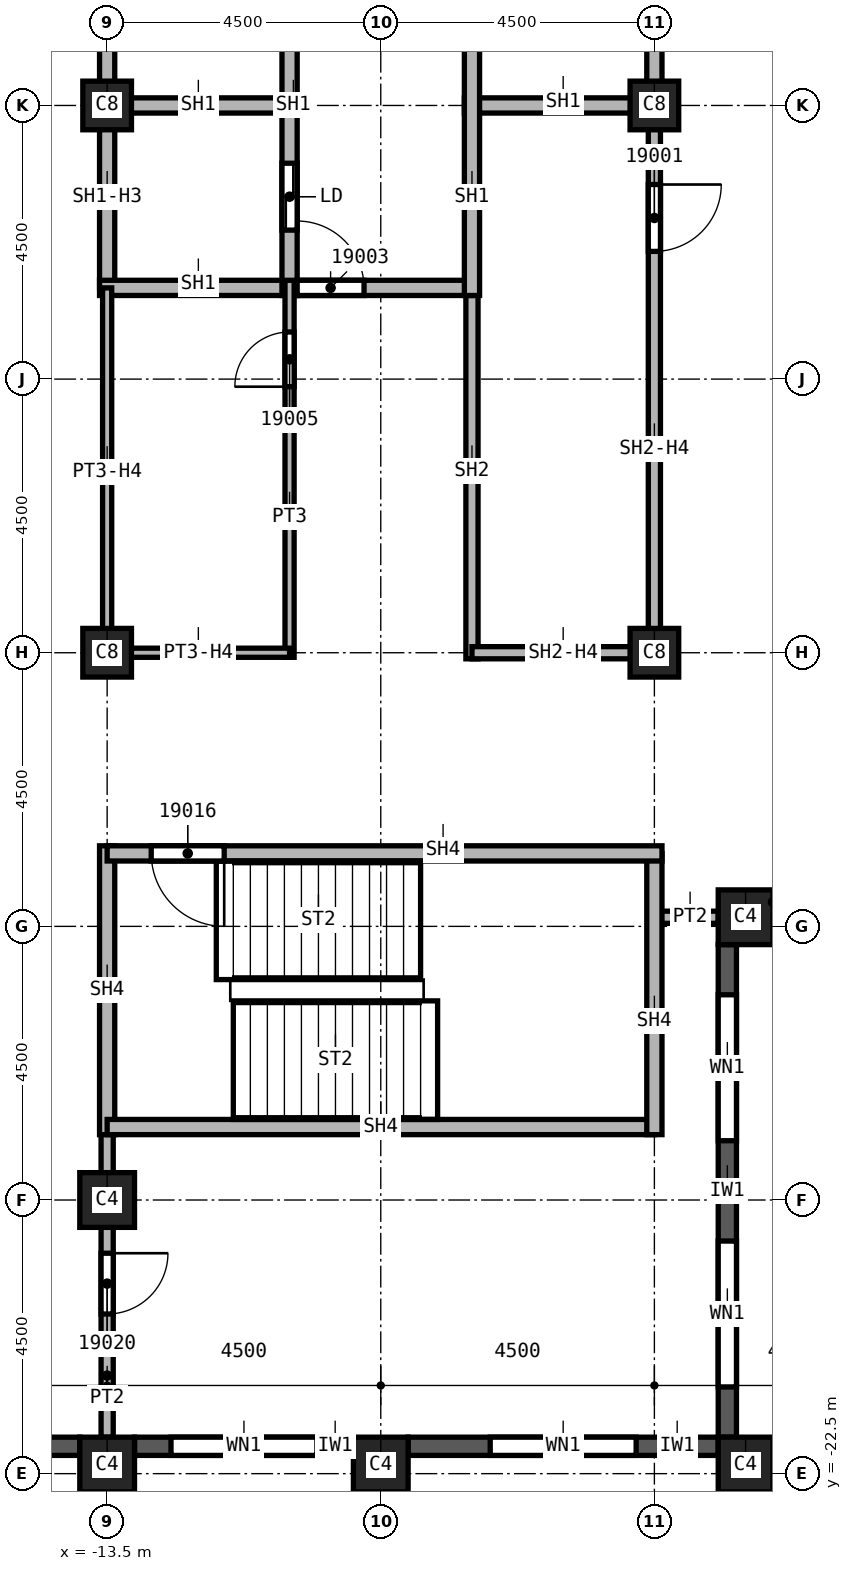
"""IFC4 building model, lengths in metres.
Left out: names, types, materials, properties, quantities, classifications, styles, units other than length and angle.
Written with IfcOpenShell. Run it as: python <this file> out.ifc"""

import sys

from ifc_helpers import new_model, si_unit, direction, frame, frame_2d, origin, origin_2d, place, context, subcontext, project, spatial, rectangle, extrude, element, fill, save


model = new_model("IFC4")
c1 = context("Model", 3, precision=1e-05, world=origin(), true_north=direction((0.0, 1.0)))
c2 = subcontext(c1, "Body", "Model", "MODEL_VIEW")
j1 = project(units=[si_unit("LENGTHUNIT", "METRE"), si_unit("PLANEANGLEUNIT", "RADIAN")], contexts=[c1])
p1 = place(None, origin())
s1 = spatial("IfcSite", under=j1, at=p1, CompositionType="ELEMENT")
p2 = place(p1, origin())
s2 = spatial("IfcBuilding", under=s1, at=p2, CompositionType="ELEMENT")
p3 = place(p2, frame((0.0, 0.0, 278.0)))
s3 = spatial("IfcBuildingStorey", under=s2, at=p3, CompositionType="ELEMENT", Elevation=278.0)
p4 = place(p3, frame((-13.5, -18.0, 0.0), z_axis=(0.0, 0.0, 1.0), x_axis=(1.0, 0.0, 0.0)))
e1 = element("IfcColumn", 1, at=p4, inside=s3, PredefinedType="COLUMN", context=c2, shape_type="SweptSolid", body=[
    extrude(rectangle(XDim=0.9, YDim=0.9, at=origin_2d()), origin(), (0.0, 0.0, 1.0), 3.72),
])
for number, where, z_axis, x_axis in (
    (2, (-4.5, 0.0, 0.0), (0.0, 0.0, 1.0), (1.0, 0.0, 0.0)),
    (3, (-4.5, -9.0, 0.0), (0.0, 0.0, 1.0), (1.0, 0.0, 0.0)),
    (4, (-13.5, 0.0, 0.0), (0.0, 0.0, 1.0), (1.0, 0.0, 0.0)),
    (5, (-13.5, -9.0, 0.0), (0.0, 0.0, 1.0), (1.0, 0.0, 0.0)),
):
    element("IfcColumn", number, at=place(p3, frame(where, z_axis=z_axis, x_axis=x_axis)), inside=s3, PredefinedType="COLUMN", context=c2, shape_type="SweptSolid", body=[
        extrude(rectangle(XDim=0.8, YDim=0.8, at=origin_2d()), origin(), (0.0, 0.0, 1.0), 3.72),
    ])
for number, where, z_axis, x_axis in (
    (6, (-3.0, -22.35, 0.0), (0.0, 0.0, 1.0), (1.0, 0.0, 0.0)),
    (7, (-9.0, -22.35, 0.0), (0.0, 0.0, 1.0), (1.0, 0.0, 0.0)),
    (8, (-13.5, -22.35, 0.0), (0.0, 0.0, 1.0), (1.0, 0.0, 0.0)),
    (9, (-3.0, -13.35, 0.0), (0.0, 0.0, 1.0), (1.0, 0.0, 0.0)),
):
    element("IfcColumn", number, at=place(p3, frame(where, z_axis=z_axis, x_axis=x_axis)), inside=s3, PredefinedType="COLUMN", context=c2, shape_type="SweptSolid", body=[
        extrude(rectangle(XDim=0.9, YDim=0.9, at=origin_2d()), origin(), (0.0, 0.0, 1.0), 3.72),
    ])
p5 = place(p3, frame((-17.55, -22.05, 0.0), z_axis=(0.0, 0.0, 1.0), x_axis=(1.0, 0.0, 0.0)))
e10 = element("IfcWall", 10, at=p5, inside=s3, PredefinedType="SOLIDWALL", context=c2, shape_type="SweptSolid", body=[
    extrude(rectangle(XDim=3.6, YDim=0.3, at=frame_2d((1.8, 0.0))), origin(), (0.0, 0.0, 1.0), 3.12),
])
p6 = place(p5, frame((0.775, 0.0, 0.8)))
e11 = element("IfcOpeningElement", 11, at=p6, cuts=e10, PredefinedType="OPENING", context=c2, shape_type="SweptSolid", body=[
    extrude(rectangle(XDim=1.0, YDim=1.95, at=frame_2d((0.5, 0.975))), frame((0.0, 0.15, 0.0), z_axis=(0.0, -1.0, 0.0), x_axis=(1.0, 0.0, 0.0)), (0.0, 0.0, 1.0), 0.3),
])
p7 = place(p5, frame((2.375, 0.0, 0.8)))
e12 = element("IfcOpeningElement", 12, at=p7, cuts=e10, PredefinedType="OPENING", context=c2, shape_type="SweptSolid", body=[
    extrude(rectangle(XDim=0.6, YDim=1.95, at=frame_2d((0.3, 0.975))), frame((0.0, 0.15, 0.0), z_axis=(0.0, -1.0, 0.0), x_axis=(1.0, 0.0, 0.0)), (0.0, 0.0, 1.0), 0.3),
])
p8 = place(p3, frame((-13.05, -22.05, 0.0), z_axis=(0.0, 0.0, 1.0), x_axis=(1.0, 0.0, 0.0)))
e13 = element("IfcWall", 13, at=p8, inside=s3, PredefinedType="SOLIDWALL", context=c2, shape_type="SweptSolid", body=[
    extrude(rectangle(XDim=3.6, YDim=0.3, at=frame_2d((1.8, 0.0))), origin(), (0.0, 0.0, 1.0), 3.12),
])
p9 = place(p8, frame((0.6, 0.0, 0.8)))
e14 = element("IfcOpeningElement", 14, at=p9, cuts=e13, PredefinedType="OPENING", context=c2, shape_type="SweptSolid", body=[
    extrude(rectangle(XDim=2.4, YDim=1.95, at=frame_2d((1.2, 0.975))), frame((0.0, 0.15, 0.0), z_axis=(0.0, -1.0, 0.0), x_axis=(1.0, 0.0, 0.0)), (0.0, 0.0, 1.0), 0.3),
])
p10 = place(p3, frame((-8.55, -22.05, 0.0), z_axis=(0.0, 0.0, 1.0), x_axis=(1.0, 0.0, 0.0)))
e15 = element("IfcWall", 15, at=p10, inside=s3, PredefinedType="SOLIDWALL", context=c2, shape_type="SweptSolid", body=[
    extrude(rectangle(XDim=5.1, YDim=0.3, at=frame_2d((2.55, 0.0))), origin(), (0.0, 0.0, 1.0), 3.12),
])
p11 = place(p10, frame((1.35, 0.0, 0.8)))
e16 = element("IfcOpeningElement", 16, at=p11, cuts=e15, PredefinedType="OPENING", context=c2, shape_type="SweptSolid", body=[
    extrude(rectangle(XDim=2.4, YDim=1.95, at=frame_2d((1.2, 0.975))), frame((0.0, 0.15, 0.0), z_axis=(0.0, -1.0, 0.0), x_axis=(1.0, 0.0, 0.0)), (0.0, 0.0, 1.0), 0.3),
])
p12 = place(p3, frame((-3.3, -21.9, 0.0), z_axis=(0.0, 0.0, 1.0), x_axis=(0.0, 1.0, 0.0)))
e17 = element("IfcWall", 17, at=p12, inside=s3, PredefinedType="SOLIDWALL", context=c2, shape_type="SweptSolid", body=[
    extrude(rectangle(XDim=8.1, YDim=0.3, at=frame_2d((4.05, 0.0))), origin(), (0.0, 0.0, 1.0), 3.12),
])
p13 = place(p12, frame((0.825, 0.0, 0.8)))
e18 = element("IfcOpeningElement", 18, at=p13, cuts=e17, PredefinedType="OPENING", context=c2, shape_type="SweptSolid", body=[
    extrude(rectangle(XDim=2.4, YDim=1.95, at=frame_2d((1.2, 0.975))), frame((0.0, 0.15, 0.0), z_axis=(0.0, -1.0, 0.0), x_axis=(1.0, 0.0, 0.0)), (0.0, 0.0, 1.0), 0.3),
])
p14 = place(p12, frame((4.875, 0.0, 0.8)))
e19 = element("IfcOpeningElement", 19, at=p14, cuts=e17, PredefinedType="OPENING", context=c2, shape_type="SweptSolid", body=[
    extrude(rectangle(XDim=2.4, YDim=1.95, at=frame_2d((1.2, 0.975))), frame((0.0, 0.15, 0.0), z_axis=(0.0, -1.0, 0.0), x_axis=(1.0, 0.0, 0.0)), (0.0, 0.0, 1.0), 0.3),
])
p15 = place(p3, frame((-13.5, -16.675, 0.0), z_axis=(0.0, 0.0, 1.0), x_axis=(0.0, -1.0, 0.0)))
e20 = element("IfcWall", 20, at=p15, inside=s3, PredefinedType="PARTITIONING", context=c2, shape_type="SweptSolid", body=[
    extrude(rectangle(XDim=5.225, YDim=0.2, at=frame_2d((2.612, 0.0))), origin(), (0.0, 0.0, 1.0), 3.72),
])
p16 = place(p15, frame((2.2, 0.0, 0.0)))
e21 = element("IfcOpeningElement", 21, at=p16, cuts=e20, PredefinedType="OPENING", context=c2, shape_type="SweptSolid", body=[
    extrude(rectangle(XDim=1.0, YDim=2.1, at=frame_2d((0.5, 1.05))), frame((0.0, 0.1, 0.0), z_axis=(0.0, -1.0, 0.0), x_axis=(1.0, 0.0, 0.0)), (0.0, 0.0, 1.0), 0.2),
])
p17 = place(p3, frame((-3.45, -13.35, 0.0), z_axis=(0.0, 0.0, 1.0), x_axis=(-1.0, 0.0, 0.0)))
e22 = element("IfcWall", 22, at=p17, inside=s3, PredefinedType="PARTITIONING", context=c2, shape_type="SweptSolid", body=[
    extrude(rectangle(XDim=1.05, YDim=0.2, at=frame_2d((0.525, 0.0))), origin(), (0.0, 0.0, 1.0), 3.72),
])
p18 = place(p3, frame((-7.5, -9.1, 0.0), z_axis=(0.0, 0.0, 1.0), x_axis=(0.0, 1.0, 0.0)))
e23 = element("IfcWall", 23, at=p18, inside=s3, PredefinedType="SOLIDWALL", context=c2, shape_type="SweptSolid", body=[
    extrude(rectangle(XDim=6.225, YDim=0.2, at=frame_2d((3.113, 0.0))), origin(), (0.0, 0.0, 1.0), 3.72),
])
p19 = place(p3, frame((-4.5, -9.0, 0.0), z_axis=(0.0, 0.0, 1.0), x_axis=(-1.0, 0.0, 0.0)))
e24 = element("IfcWall", 24, at=p19, inside=s3, PredefinedType="SOLIDWALL", context=c2, shape_type="SweptSolid", body=[
    extrude(rectangle(XDim=3.0, YDim=0.2, at=frame_2d((1.5, 0.0))), origin(), (0.0, 0.0, 1.0), 3.042),
])
p20 = place(p3, frame((-4.5, 0.0, 0.0), z_axis=(0.0, 0.0, 1.0), x_axis=(0.0, -1.0, 0.0)))
e25 = element("IfcWall", 25, at=p20, inside=s3, PredefinedType="SOLIDWALL", context=c2, shape_type="SweptSolid", body=[
    extrude(rectangle(XDim=9.1, YDim=0.2, at=frame_2d((4.55, 0.0))), origin(), (0.0, 0.0, 1.0), 3.042),
])
p21 = place(p20, frame((1.3, 0.0, 0.0)))
e26 = element("IfcOpeningElement", 26, at=p21, cuts=e25, PredefinedType="OPENING", context=c2, shape_type="SweptSolid", body=[
    extrude(rectangle(XDim=1.1, YDim=2.1, at=frame_2d((0.55, 1.05))), frame((0.0, 0.1, 0.0), z_axis=(0.0, -1.0, 0.0), x_axis=(1.0, 0.0, 0.0)), (0.0, 0.0, 1.0), 0.2),
])
p22 = place(p3, frame((-13.625, 0.0, 0.0), z_axis=(0.0, 0.0, 1.0), x_axis=(1.0, 0.0, 0.0)))
e27 = element("IfcWall", 27, at=p22, inside=s3, PredefinedType="SOLIDWALL", context=c2, shape_type="SweptSolid", body=[
    extrude(rectangle(XDim=3.125, YDim=0.25, at=frame_2d((1.562, 0.0))), origin(), (0.0, 0.0, 1.0), 3.72),
])
p23 = place(p3, frame((-13.5, -3.0, 0.0), z_axis=(0.0, 0.0, 1.0), x_axis=(0.0, 1.0, 0.0)))
e28 = element("IfcWall", 28, at=p23, inside=s3, PredefinedType="SOLIDWALL", context=c2, shape_type="SweptSolid", body=[
    extrude(rectangle(XDim=6.0, YDim=0.25, at=frame_2d((3.0, 0.0))), origin(), (0.0, 0.0, 1.0), 3.042),
])
p24 = place(p3, frame((-13.625, -3.0, 0.0), z_axis=(0.0, 0.0, 1.0), x_axis=(1.0, 0.0, 0.0)))
e29 = element("IfcWall", 29, at=p24, inside=s3, PredefinedType="SOLIDWALL", context=c2, shape_type="SweptSolid", body=[
    extrude(rectangle(XDim=6.125, YDim=0.25, at=frame_2d((3.062, 0.0))), origin(), (0.0, 0.0, 1.0), 3.72),
])
p25 = place(p24, frame((3.25, 0.0, 0.0)))
e30 = element("IfcOpeningElement", 30, at=p25, cuts=e29, PredefinedType="OPENING", context=c2, shape_type="SweptSolid", body=[
    extrude(rectangle(XDim=1.1, YDim=2.1, at=frame_2d((0.55, 1.05))), frame((0.0, 0.125, 0.0), z_axis=(0.0, -1.0, 0.0), x_axis=(1.0, 0.0, 0.0)), (0.0, 0.0, 1.0), 0.25),
])
p26 = place(p3, frame((-10.5, -3.125, 0.0), z_axis=(0.0, 0.0, 1.0), x_axis=(0.0, 1.0, 0.0)))
e31 = element("IfcWall", 31, at=p26, inside=s3, PredefinedType="SOLIDWALL", context=c2, shape_type="SweptSolid", body=[
    extrude(rectangle(XDim=6.25, YDim=0.25, at=frame_2d((3.125, 0.0))), origin(), (0.0, 0.0, 1.0), 3.72),
])
p27 = place(p26, frame((1.075, 0.0, 0.0)))
e32 = element("IfcOpeningElement", 32, at=p27, cuts=e31, PredefinedType="OPENING", context=c2, shape_type="SweptSolid", body=[
    extrude(rectangle(XDim=1.1, YDim=2.1, at=frame_2d((0.55, 1.05))), frame((0.0, 0.125, 0.0), z_axis=(0.0, -1.0, 0.0), x_axis=(1.0, 0.0, 0.0)), (0.0, 0.0, 1.0), 0.25),
])
p28 = place(p26, frame((4.075, 0.0, 0.0)))
e33 = element("IfcOpeningElement", 33, at=p28, cuts=e31, PredefinedType="OPENING", context=c2, shape_type="SweptSolid", body=[
    extrude(rectangle(XDim=1.1, YDim=2.1, at=frame_2d((0.55, 1.05))), frame((0.0, 0.125, 0.0), z_axis=(0.0, -1.0, 0.0), x_axis=(1.0, 0.0, 0.0)), (0.0, 0.0, 1.0), 0.25),
])
p29 = place(p3, frame((-7.625, 0.0, 0.0), z_axis=(0.0, 0.0, 1.0), x_axis=(1.0, 0.0, 0.0)))
e34 = element("IfcWall", 34, at=p29, inside=s3, PredefinedType="SOLIDWALL", context=c2, shape_type="SweptSolid", body=[
    extrude(rectangle(XDim=3.25, YDim=0.25, at=frame_2d((1.625, 0.0))), origin(), (0.0, 0.0, 1.0), 3.72),
])
p30 = place(p3, frame((-7.5, -3.125, 0.0), z_axis=(0.0, 0.0, 1.0), x_axis=(0.0, 1.0, 0.0)))
e35 = element("IfcWall", 35, at=p30, inside=s3, PredefinedType="SOLIDWALL", context=c2, shape_type="SweptSolid", body=[
    extrude(rectangle(XDim=9.125, YDim=0.25, at=frame_2d((4.562, 0.0))), origin(), (0.0, 0.0, 1.0), 3.72),
])
p31 = place(p3, frame((-4.5, 6.0, 0.0), z_axis=(0.0, 0.0, 1.0), x_axis=(0.0, -1.0, 0.0)))
e36 = element("IfcWall", 36, at=p31, inside=s3, PredefinedType="SOLIDWALL", context=c2, shape_type="SweptSolid", body=[
    extrude(rectangle(XDim=6.0, YDim=0.25, at=frame_2d((3.0, 0.0))), origin(), (0.0, 0.0, 1.0), 3.042),
])
p32 = place(p31, frame((3.95, 0.0, 0.0)))
e37 = element("IfcOpeningElement", 37, at=p32, cuts=e36, PredefinedType="OPENING", context=c2, shape_type="SweptSolid", body=[
    extrude(rectangle(XDim=1.1, YDim=2.1, at=frame_2d((0.55, 1.05))), frame((0.0, 0.125, 0.0), z_axis=(0.0, -1.0, 0.0), x_axis=(1.0, 0.0, 0.0)), (0.0, 0.0, 1.0), 0.25),
])
p33 = place(p31, frame((0.95, 0.0, 0.0)))
e38 = element("IfcOpeningElement", 38, at=p33, cuts=e36, PredefinedType="OPENING", context=c2, shape_type="SweptSolid", body=[
    extrude(rectangle(XDim=1.1, YDim=2.1, at=frame_2d((0.55, 1.05))), frame((0.0, 0.125, 0.0), z_axis=(0.0, -1.0, 0.0), x_axis=(1.0, 0.0, 0.0)), (0.0, 0.0, 1.0), 0.25),
])
p34 = place(p3, frame((-13.5, -12.175, 0.0), z_axis=(0.0, 0.0, 1.0), x_axis=(0.0, -1.0, 0.0)))
e39 = element("IfcWall", 39, at=p34, inside=s3, PredefinedType="SOLIDWALL", context=c2, shape_type="SweptSolid", body=[
    extrude(rectangle(XDim=4.75, YDim=0.25, at=frame_2d((2.375, 0.0))), origin(), (0.0, 0.0, 1.0), 3.72),
])
p35 = place(p3, frame((-4.5, -16.8, 0.0), z_axis=(0.0, 0.0, 1.0), x_axis=(-1.0, 0.0, 0.0)))
e40 = element("IfcWall", 40, at=p35, inside=s3, PredefinedType="SOLIDWALL", context=c2, shape_type="SweptSolid", body=[
    extrude(rectangle(XDim=9.0, YDim=0.25, at=frame_2d((4.5, 0.0))), origin(), (0.0, 0.0, 1.0), 3.72),
])
p36 = place(p3, frame((-4.5, -12.3, 0.0), z_axis=(0.0, 0.0, 1.0), x_axis=(0.0, -1.0, 0.0)))
e41 = element("IfcWall", 41, at=p36, inside=s3, PredefinedType="SOLIDWALL", context=c2, shape_type="SweptSolid", body=[
    extrude(rectangle(XDim=4.625, YDim=0.25, at=frame_2d((2.312, 0.0))), origin(), (0.0, 0.0, 1.0), 3.72),
])
p37 = place(p3, frame((-4.375, -12.3, 0.0), z_axis=(0.0, 0.0, 1.0), x_axis=(-1.0, 0.0, 0.0)))
e42 = element("IfcWall", 42, at=p37, inside=s3, PredefinedType="SOLIDWALL", context=c2, shape_type="SweptSolid", body=[
    extrude(rectangle(XDim=9.125, YDim=0.25, at=frame_2d((4.562, 0.0))), origin(), (0.0, 0.0, 1.0), 3.72),
])
p38 = place(p37, frame((7.2, 0.0, 0.0)))
e43 = element("IfcOpeningElement", 43, at=p38, cuts=e42, PredefinedType="OPENING", context=c2, shape_type="SweptSolid", body=[
    extrude(rectangle(XDim=1.2, YDim=2.1, at=frame_2d((0.6, 1.05))), frame((0.0, 0.125, 0.0), z_axis=(0.0, -1.0, 0.0), x_axis=(1.0, 0.0, 0.0)), (0.0, 0.0, 1.0), 0.25),
])
p39 = place(p3, frame((-13.5, -9.075, 0.0), z_axis=(0.0, 0.0, 1.0), x_axis=(0.0, 1.0, 0.0)))
e44 = element("IfcWall", 44, at=p39, inside=s3, PredefinedType="PARTITIONING", context=c2, shape_type="SweptSolid", body=[
    extrude(rectangle(XDim=6.075, YDim=0.15, at=frame_2d((3.038, 0.0))), origin(), (0.0, 0.0, 1.0), 3.042),
])
p40 = place(p3, frame((-10.5, -9.075, 0.0), z_axis=(0.0, 0.0, 1.0), x_axis=(0.0, 1.0, 0.0)))
e45 = element("IfcWall", 45, at=p40, inside=s3, PredefinedType="PARTITIONING", context=c2, shape_type="SweptSolid", body=[
    extrude(rectangle(XDim=6.2, YDim=0.15, at=frame_2d((3.1, 0.0))), origin(), (0.0, 0.0, 1.0), 3.72),
])
p41 = place(p40, frame((4.45, 0.0, 0.0)))
e46 = element("IfcOpeningElement", 46, at=p41, cuts=e45, PredefinedType="OPENING", context=c2, shape_type="SweptSolid", body=[
    extrude(rectangle(XDim=0.9, YDim=2.1, at=frame_2d((0.45, 1.05))), frame((0.0, 0.075, 0.0), z_axis=(0.0, -1.0, 0.0), x_axis=(1.0, 0.0, 0.0)), (0.0, 0.0, 1.0), 0.15),
])
p42 = place(p3, frame((-10.5, -9.0, 0.0), z_axis=(0.0, 0.0, 1.0), x_axis=(-1.0, 0.0, 0.0)))
e47 = element("IfcWall", 47, at=p42, inside=s3, PredefinedType="PARTITIONING", context=c2, shape_type="SweptSolid", body=[
    extrude(rectangle(XDim=3.0, YDim=0.15, at=frame_2d((1.5, 0.0))), origin(), (0.0, 0.0, 1.0), 3.042),
])
p43 = place(p9, origin())
e48 = element("IfcWindow", 48, at=p43, inside=s3, PartitioningType="SINGLE_PANEL", PredefinedType="WINDOW", context=c2, shape_type="SweptSolid", body=[
    extrude(rectangle(XDim=2.4, YDim=1.95, at=frame_2d((1.2, 0.975))), frame((0.0, 0.03, 0.0), z_axis=(0.0, -1.0, 0.0), x_axis=(1.0, 0.0, 0.0)), (0.0, 0.0, 1.0), 0.06),
])
fill(e14, e48)
p44 = place(p11, origin())
e49 = element("IfcWindow", 49, at=p44, inside=s3, PartitioningType="SINGLE_PANEL", PredefinedType="WINDOW", context=c2, shape_type="SweptSolid", body=[
    extrude(rectangle(XDim=2.4, YDim=1.95, at=frame_2d((1.2, 0.975))), frame((0.0, 0.03, 0.0), z_axis=(0.0, -1.0, 0.0), x_axis=(1.0, 0.0, 0.0)), (0.0, 0.0, 1.0), 0.06),
])
fill(e16, e49)
p45 = place(p13, origin())
e50 = element("IfcWindow", 50, at=p45, inside=s3, PartitioningType="SINGLE_PANEL", PredefinedType="WINDOW", context=c2, shape_type="SweptSolid", body=[
    extrude(rectangle(XDim=2.4, YDim=1.95, at=frame_2d((1.2, 0.975))), frame((0.0, 0.03, 0.0), z_axis=(0.0, -1.0, 0.0), x_axis=(1.0, 0.0, 0.0)), (0.0, 0.0, 1.0), 0.06),
])
fill(e18, e50)
p46 = place(p14, origin())
e51 = element("IfcWindow", 51, at=p46, inside=s3, PartitioningType="SINGLE_PANEL", PredefinedType="WINDOW", context=c2, shape_type="SweptSolid", body=[
    extrude(rectangle(XDim=2.4, YDim=1.95, at=frame_2d((1.2, 0.975))), frame((0.0, 0.03, 0.0), z_axis=(0.0, -1.0, 0.0), x_axis=(1.0, 0.0, 0.0)), (0.0, 0.0, 1.0), 0.06),
])
fill(e19, e51)
p47 = place(p21, origin())
e52 = element("IfcDoor", 52, at=p47, inside=s3, OperationType="SINGLE_SWING_RIGHT", PredefinedType="DOOR", context=c2, shape_type="SweptSolid", body=[
    extrude(rectangle(XDim=1.1, YDim=2.1, at=frame_2d((0.55, 1.05))), frame((0.0, 0.025, 0.0), z_axis=(0.0, -1.0, 0.0), x_axis=(1.0, 0.0, 0.0)), (0.0, 0.0, 1.0), 0.05),
])
fill(e26, e52)
p48 = place(p25, origin())
e53 = element("IfcDoor", 53, at=p48, inside=s3, OperationType="SINGLE_SWING_RIGHT", PredefinedType="DOOR", context=c2, shape_type="SweptSolid", body=[
    extrude(rectangle(XDim=1.1, YDim=2.1, at=frame_2d((0.55, 1.05))), frame((0.0, 0.025, 0.0), z_axis=(0.0, -1.0, 0.0), x_axis=(1.0, 0.0, 0.0)), (0.0, 0.0, 1.0), 0.05),
])
fill(e30, e53)
p49 = place(p41, origin())
e54 = element("IfcDoor", 54, at=p49, inside=s3, OperationType="SINGLE_SWING_RIGHT", PredefinedType="DOOR", context=c2, shape_type="SweptSolid", body=[
    extrude(rectangle(XDim=0.9, YDim=2.1, at=frame_2d((0.45, 1.05))), frame((0.0, 0.025, 0.0), z_axis=(0.0, -1.0, 0.0), x_axis=(1.0, 0.0, 0.0)), (0.0, 0.0, 1.0), 0.05),
])
fill(e46, e54)
p50 = place(p38, origin())
e55 = element("IfcDoor", 55, at=p50, inside=s3, OperationType="SINGLE_SWING_LEFT", PredefinedType="DOOR", context=c2, shape_type="SweptSolid", body=[
    extrude(rectangle(XDim=1.2, YDim=2.1, at=frame_2d((0.6, 1.05))), frame((0.0, 0.025, 0.0), z_axis=(0.0, -1.0, 0.0), x_axis=(1.0, 0.0, 0.0)), (0.0, 0.0, 1.0), 0.05),
])
fill(e43, e55)
p51 = place(p16, origin())
e56 = element("IfcDoor", 56, at=p51, inside=s3, OperationType="SINGLE_SWING_LEFT", PredefinedType="DOOR", context=c2, shape_type="SweptSolid", body=[
    extrude(rectangle(XDim=1.0, YDim=2.1, at=frame_2d((0.5, 1.05))), frame((0.0, 0.025, 0.0), z_axis=(0.0, -1.0, 0.0), x_axis=(1.0, 0.0, 0.0)), (0.0, 0.0, 1.0), 0.05),
])
fill(e21, e56)
p52 = place(p27, origin())
e57 = element("IfcDoor", 57, at=p52, inside=s3, OperationType="SLIDING_TO_LEFT", PredefinedType="DOOR", context=c2, shape_type="SweptSolid", body=[
    extrude(rectangle(XDim=1.1, YDim=2.1, at=frame_2d((0.55, 1.05))), frame((0.0, 0.025, 0.0), z_axis=(0.0, -1.0, 0.0), x_axis=(1.0, 0.0, 0.0)), (0.0, 0.0, 1.0), 0.05),
])
fill(e32, e57)
save(model, sys.argv[1])
